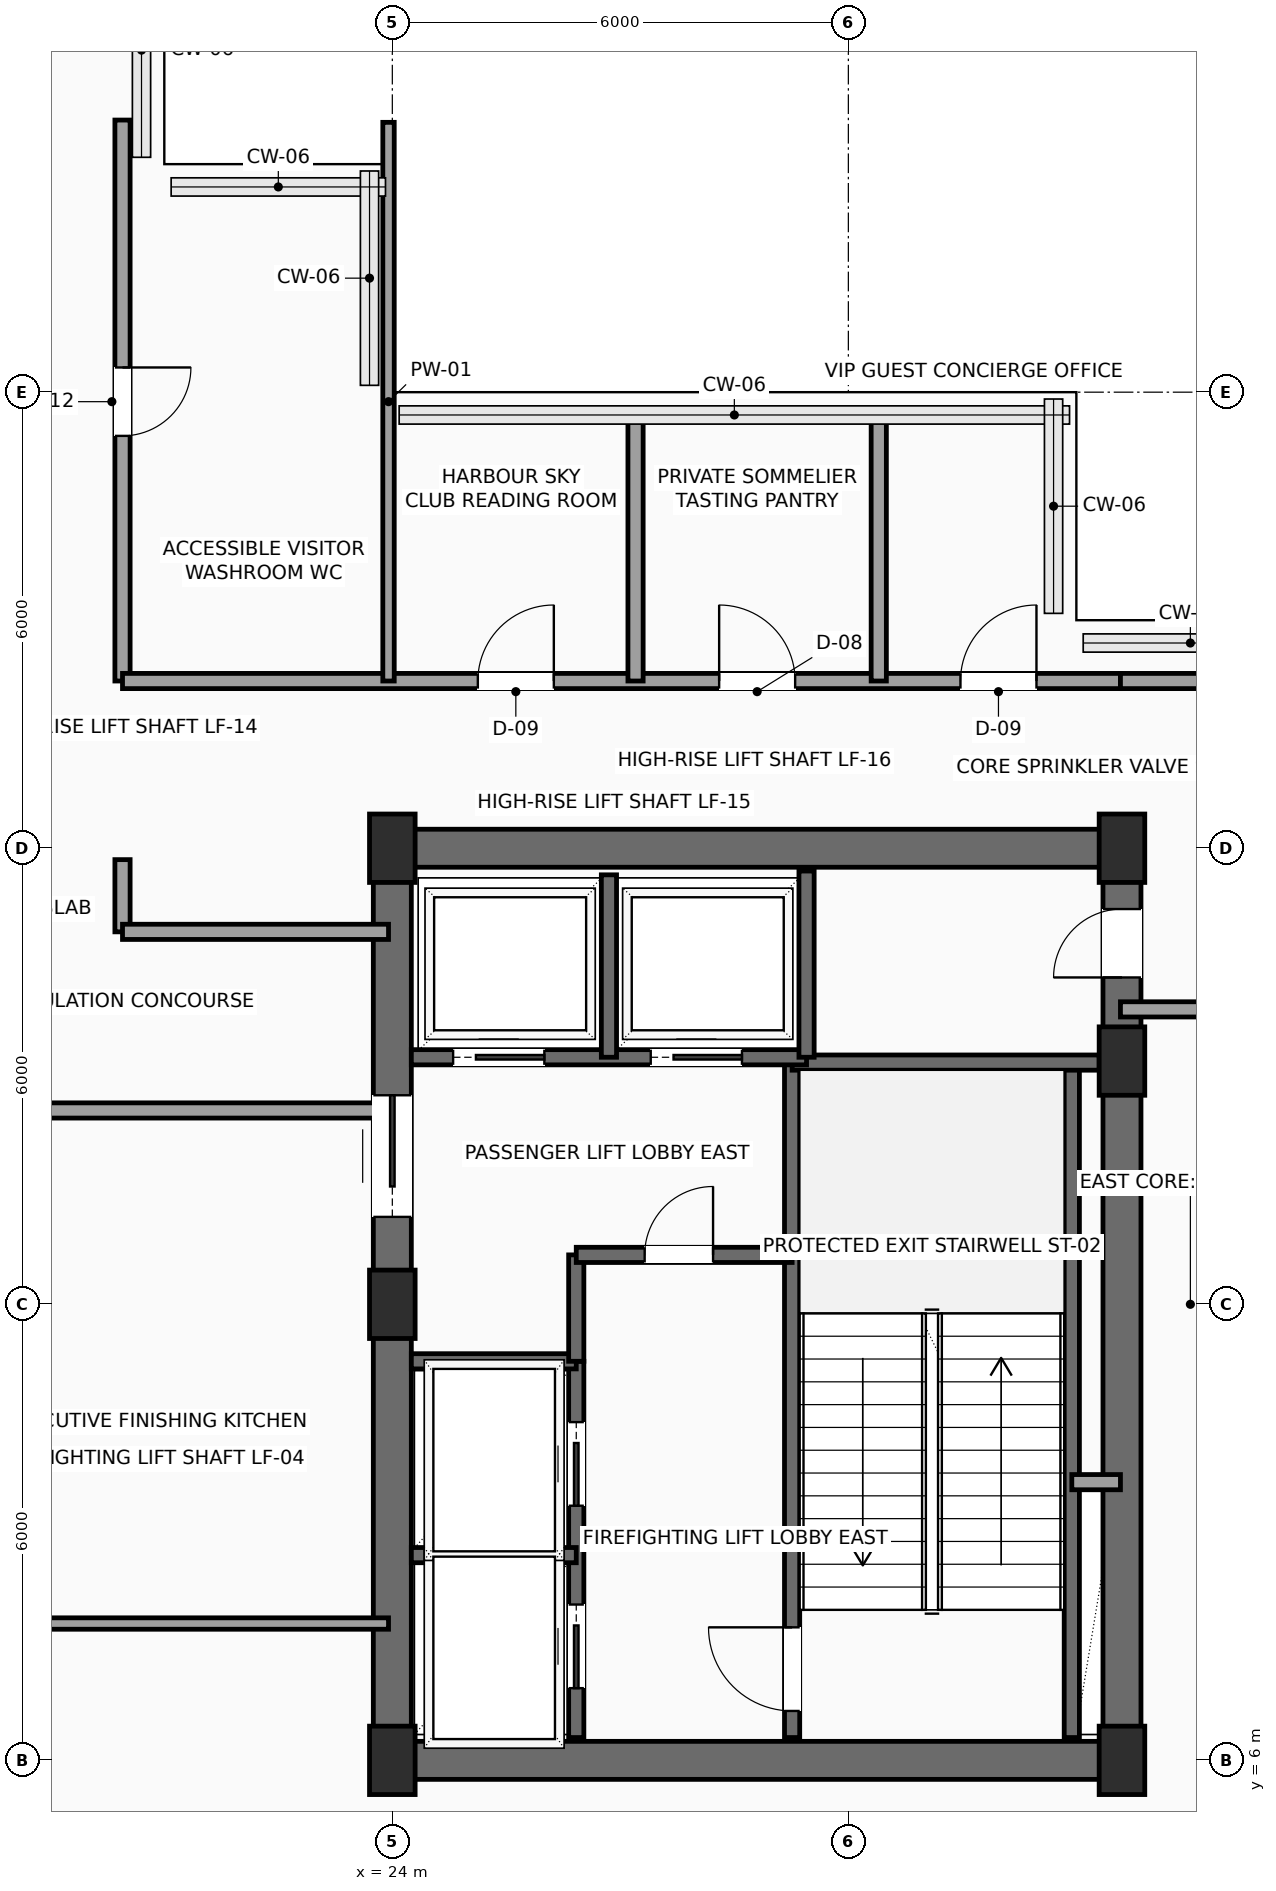
"""IFC4 building model, lengths in metres.
Left out: names, types, materials, properties, quantities, classifications, styles, units other than length and angle.
Written with IfcOpenShell. Run it as: python <this file> out.ifc"""

import sys

from ifc_helpers import new_model, si_unit, direction, frame, frame_2d, origin, origin_2d, place, context, subcontext, project, spatial, rectangle, extrude, element, fill, save


model = new_model("IFC4")
c1 = context("Model", 3, precision=1e-05, world=origin(), true_north=direction((0.0, 1.0)))
c2 = subcontext(c1, "Body", "Model", "MODEL_VIEW")
j1 = project(units=[si_unit("LENGTHUNIT", "METRE"), si_unit("PLANEANGLEUNIT", "RADIAN")], contexts=[c1])
p1 = place(None, origin())
s1 = spatial("IfcSite", under=j1, at=p1, CompositionType="ELEMENT")
p2 = place(p1, origin())
s2 = spatial("IfcBuilding", under=s1, at=p2, CompositionType="ELEMENT")
p3 = place(p2, frame((0.0, 0.0, 292.2)))
s3 = spatial("IfcBuildingStorey", under=s2, at=p3, CompositionType="ELEMENT", Elevation=292.2)
for number, where, z_axis, x_axis in (
    (1, (24.0, 6.0, 0.0), (0.0, 0.0, 1.0), (1.0, 0.0, 0.0)),
    (2, (24.0, 12.0, 0.0), (0.0, 0.0, 1.0), (1.0, 0.0, 0.0)),
    (3, (24.0, 18.0, 0.0), (0.0, 0.0, 1.0), (1.0, 0.0, 0.0)),
    (4, (33.6, 6.0, 0.0), (0.0, 0.0, 1.0), (1.0, 0.0, 0.0)),
    (5, (33.6, 15.2, 0.0), (0.0, 0.0, 1.0), (1.0, 0.0, 0.0)),
    (6, (33.6, 18.0, 0.0), (0.0, 0.0, 1.0), (1.0, 0.0, 0.0)),
):
    element("IfcColumn", number, at=place(p3, frame(where, z_axis=z_axis, x_axis=x_axis)), inside=s3, PredefinedType="COLUMN", context=c2, shape_type="SweptSolid", body=[
        extrude(rectangle(XDim=0.6, YDim=0.9, at=origin_2d()), origin(), (0.0, 0.0, 1.0), 4.2),
    ])
for number, where, z_axis, x_axis in (
    (7, (24.0, 6.0, 0.0), (0.0, 0.0, 1.0), (1.0, 0.0, 0.0)),
    (8, (24.0, 18.0, 0.0), (0.0, 0.0, 1.0), (1.0, 0.0, 0.0)),
):
    element("IfcWall", number, at=place(p3, frame(where, z_axis=z_axis, x_axis=x_axis)), inside=s3, PredefinedType="SHEAR", context=c2, shape_type="SweptSolid", body=[
        extrude(rectangle(XDim=9.6, YDim=0.5, at=frame_2d((4.8, 0.0))), origin(), (0.0, 0.0, 1.0), 4.0),
    ])
p4 = place(p3, frame((24.0, 6.0, 0.0), z_axis=(0.0, 0.0, 1.0), x_axis=(0.0, 1.0, 0.0)))
e9 = element("IfcWall", 9, at=p4, inside=s3, PredefinedType="SHEAR", context=c2, shape_type="SweptSolid", body=[
    extrude(rectangle(XDim=12.0, YDim=0.5, at=frame_2d((6.0, 0.0))), origin(), (0.0, 0.0, 1.0), 4.0),
])
p5 = place(p4, frame((7.15, 0.0, 0.0)))
e10 = element("IfcOpeningElement", 10, at=p5, cuts=e9, PredefinedType="OPENING", context=c2, shape_type="SweptSolid", body=[
    extrude(rectangle(XDim=1.6, YDim=2.3, at=frame_2d((0.8, 1.15))), frame((0.0, 0.26, 0.0), z_axis=(0.0, -1.0, 0.0), x_axis=(1.0, 0.0, 0.0)), (0.0, 0.0, 1.0), 0.52),
])
p6 = place(p3, frame((33.6, 6.0, 0.0), z_axis=(0.0, 0.0, 1.0), x_axis=(0.0, 1.0, 0.0)))
e11 = element("IfcWall", 11, at=p6, inside=s3, PredefinedType="SHEAR", context=c2, shape_type="SweptSolid", body=[
    extrude(rectangle(XDim=12.0, YDim=0.5, at=frame_2d((6.0, 0.0))), origin(), (0.0, 0.0, 1.0), 4.0),
])
p7 = place(p6, frame((10.3, 0.0, 0.0)))
e12 = element("IfcOpeningElement", 12, at=p7, cuts=e11, PredefinedType="OPENING", context=c2, shape_type="SweptSolid", body=[
    extrude(rectangle(XDim=0.9, YDim=2.15, at=frame_2d((0.45, 1.075))), frame((0.0, 0.26, 0.0), z_axis=(0.0, -1.0, 0.0), x_axis=(1.0, 0.0, 0.0)), (0.0, 0.0, 1.0), 0.52),
])
p8 = place(p3, frame((29.26, 6.3, 0.0), z_axis=(0.0, 0.0, 1.0), x_axis=(0.0, 1.0, 0.0)))
e13 = element("IfcWall", 13, at=p8, inside=s3, PredefinedType="SHEAR", context=c2, shape_type="SweptSolid", body=[
    extrude(rectangle(XDim=8.88, YDim=0.2, at=frame_2d((4.44, 0.0))), origin(), (0.0, 0.0, 1.0), 4.0),
])
p9 = place(p8, frame((0.35, 0.0, 0.0)))
e14 = element("IfcOpeningElement", 14, at=p9, cuts=e13, PredefinedType="OPENING", context=c2, shape_type="SweptSolid", body=[
    extrude(rectangle(XDim=1.1, YDim=2.2, at=frame_2d((0.55, 1.1))), frame((0.0, 0.11, 0.0), z_axis=(0.0, -1.0, 0.0), x_axis=(1.0, 0.0, 0.0)), (0.0, 0.0, 1.0), 0.22),
])
p10 = place(p3, frame((32.94, 6.3, 0.0), z_axis=(0.0, 0.0, 1.0), x_axis=(0.0, 1.0, 0.0)))
e15 = element("IfcWall", 15, at=p10, inside=s3, PredefinedType="SHEAR", context=c2, shape_type="SweptSolid", body=[
    extrude(rectangle(XDim=8.88, YDim=0.2, at=frame_2d((4.44, 0.0))), origin(), (0.0, 0.0, 1.0), 4.0),
])
p11 = place(p3, frame((29.26, 15.18, 0.0), z_axis=(0.0, 0.0, 1.0), x_axis=(1.0, 0.0, 0.0)))
e16 = element("IfcWall", 16, at=p11, inside=s3, PredefinedType="SHEAR", context=c2, shape_type="SweptSolid", body=[
    extrude(rectangle(XDim=4.04, YDim=0.2, at=frame_2d((2.02, 0.0))), origin(), (0.0, 0.0, 1.0), 4.0),
])
p12 = place(p3, frame((26.42, 6.3, 0.0), z_axis=(0.0, 0.0, 1.0), x_axis=(0.0, 1.0, 0.0)))
e17 = element("IfcWall", 17, at=p12, inside=s3, PredefinedType="SHEAR", context=c2, shape_type="SweptSolid", body=[
    extrude(rectangle(XDim=4.95, YDim=0.2, at=frame_2d((2.475, 0.0))), origin(), (0.0, 0.0, 1.0), 4.0),
])
p13 = place(p12, frame((0.65, 0.0, 0.0)))
e18 = element("IfcOpeningElement", 18, at=p13, cuts=e17, PredefinedType="OPENING", context=c2, shape_type="SweptSolid", body=[
    extrude(rectangle(XDim=1.1, YDim=2.2, at=frame_2d((0.55, 1.1))), frame((0.0, 0.11, 0.0), z_axis=(0.0, -1.0, 0.0), x_axis=(1.0, 0.0, 0.0)), (0.0, 0.0, 1.0), 0.22),
])
p14 = place(p12, frame((3.05, 0.0, 0.0)))
e19 = element("IfcOpeningElement", 19, at=p14, cuts=e17, PredefinedType="OPENING", context=c2, shape_type="SweptSolid", body=[
    extrude(rectangle(XDim=1.1, YDim=2.2, at=frame_2d((0.55, 1.1))), frame((0.0, 0.11, 0.0), z_axis=(0.0, -1.0, 0.0), x_axis=(1.0, 0.0, 0.0)), (0.0, 0.0, 1.0), 0.22),
])
for number, where, z_axis, x_axis in (
    (20, (24.25, 8.7, 0.0), (0.0, 0.0, 1.0), (1.0, 0.0, 0.0)),
    (21, (24.25, 11.25, 0.0), (0.0, 0.0, 1.0), (1.0, 0.0, 0.0)),
):
    element("IfcWall", number, at=place(p3, frame(where, z_axis=z_axis, x_axis=x_axis)), inside=s3, PredefinedType="SHEAR", context=c2, shape_type="SweptSolid", body=[
        extrude(rectangle(XDim=2.17, YDim=0.2, at=frame_2d((1.085, 0.0))), origin(), (0.0, 0.0, 1.0), 4.0),
    ])
p15 = place(p3, frame((26.42, 11.25, 0.0), z_axis=(0.0, 0.0, 1.0), x_axis=(0.0, 1.0, 0.0)))
e22 = element("IfcWall", 22, at=p15, inside=s3, PredefinedType="SHEAR", context=c2, shape_type="SweptSolid", body=[
    extrude(rectangle(XDim=1.4, YDim=0.2, at=frame_2d((0.7, 0.0))), origin(), (0.0, 0.0, 1.0), 4.0),
])
p16 = place(p3, frame((26.42, 12.65, 0.0), z_axis=(0.0, 0.0, 1.0), x_axis=(1.0, 0.0, 0.0)))
e23 = element("IfcWall", 23, at=p16, inside=s3, PredefinedType="SHEAR", context=c2, shape_type="SweptSolid", body=[
    extrude(rectangle(XDim=2.84, YDim=0.2, at=frame_2d((1.42, 0.0))), origin(), (0.0, 0.0, 1.0), 4.0),
])
p17 = place(p16, frame((0.9, 0.0, 0.0)))
e24 = element("IfcOpeningElement", 24, at=p17, cuts=e23, PredefinedType="OPENING", context=c2, shape_type="SweptSolid", body=[
    extrude(rectangle(XDim=0.9, YDim=2.15, at=frame_2d((0.45, 1.075))), frame((0.0, 0.11, 0.0), z_axis=(0.0, -1.0, 0.0), x_axis=(1.0, 0.0, 0.0)), (0.0, 0.0, 1.0), 0.22),
])
p18 = place(p3, frame((32.94, 9.66, 0.0), z_axis=(0.0, 0.0, 1.0), x_axis=(1.0, 0.0, 0.0)))
e25 = element("IfcWall", 25, at=p18, inside=s3, PredefinedType="SOLIDWALL", context=c2, shape_type="SweptSolid", body=[
    extrude(rectangle(XDim=0.64, YDim=0.2, at=frame_2d((0.32, 0.0))), origin(), (0.0, 0.0, 1.0), 4.0),
])
p19 = place(p3, frame((24.25, 15.25, 0.0), z_axis=(0.0, 0.0, 1.0), x_axis=(1.0, 0.0, 0.0)))
e26 = element("IfcWall", 26, at=p19, inside=s3, PredefinedType="SHEAR", context=c2, shape_type="SweptSolid", body=[
    extrude(rectangle(XDim=5.2, YDim=0.2, at=frame_2d((2.6, 0.0))), origin(), (0.0, 0.0, 1.0), 4.0),
])
p20 = place(p19, frame((0.55, 0.0, 0.0)))
e27 = element("IfcOpeningElement", 27, at=p20, cuts=e26, PredefinedType="OPENING", context=c2, shape_type="SweptSolid", body=[
    extrude(rectangle(XDim=1.2, YDim=2.2, at=frame_2d((0.6, 1.1))), frame((0.0, 0.11, 0.0), z_axis=(0.0, -1.0, 0.0), x_axis=(1.0, 0.0, 0.0)), (0.0, 0.0, 1.0), 0.22),
])
p21 = place(p19, frame((3.15, 0.0, 0.0)))
e28 = element("IfcOpeningElement", 28, at=p21, cuts=e26, PredefinedType="OPENING", context=c2, shape_type="SweptSolid", body=[
    extrude(rectangle(XDim=1.2, YDim=2.2, at=frame_2d((0.6, 1.1))), frame((0.0, 0.11, 0.0), z_axis=(0.0, -1.0, 0.0), x_axis=(1.0, 0.0, 0.0)), (0.0, 0.0, 1.0), 0.22),
])
p22 = place(p3, frame((26.85, 15.25, 0.0), z_axis=(0.0, 0.0, 1.0), x_axis=(0.0, 1.0, 0.0)))
e29 = element("IfcWall", 29, at=p22, inside=s3, PredefinedType="SHEAR", context=c2, shape_type="SweptSolid", body=[
    extrude(rectangle(XDim=2.4, YDim=0.2, at=frame_2d((1.2, 0.0))), origin(), (0.0, 0.0, 1.0), 4.0),
])
p23 = place(p3, frame((29.45, 15.25, 0.0), z_axis=(0.0, 0.0, 1.0), x_axis=(0.0, 1.0, 0.0)))
e30 = element("IfcWall", 30, at=p23, inside=s3, PredefinedType="SHEAR", context=c2, shape_type="SweptSolid", body=[
    extrude(rectangle(XDim=2.45, YDim=0.2, at=frame_2d((1.225, 0.0))), origin(), (0.0, 0.0, 1.0), 4.0),
])
p24 = place(p3, frame((20.45, 27.58, 0.0), z_axis=(0.0, 0.0, 1.0), x_axis=(0.0, -1.0, 0.0)))
e31 = element("IfcWall", 31, at=p24, inside=s3, PredefinedType="PARTITIONING", context=c2, shape_type="SweptSolid", body=[
    extrude(rectangle(XDim=7.38, YDim=0.2, at=frame_2d((3.69, 0.0))), origin(), (0.0, 0.0, 1.0), 4.0),
])
p25 = place(p24, frame((3.255, 0.0, 0.0)))
e32 = element("IfcOpeningElement", 32, at=p25, cuts=e31, PredefinedType="OPENING", context=c2, shape_type="SweptSolid", body=[
    extrude(rectangle(XDim=0.9, YDim=2.1, at=frame_2d((0.45, 1.05))), frame((0.0, 0.11, 0.0), z_axis=(0.0, -1.0, 0.0), x_axis=(1.0, 0.0, 0.0)), (0.0, 0.0, 1.0), 0.22),
])
p26 = place(p3, frame((20.45, 20.2, 0.0), z_axis=(0.0, 0.0, 1.0), x_axis=(1.0, 0.0, 0.0)))
e33 = element("IfcWall", 33, at=p26, inside=s3, PredefinedType="PARTITIONING", context=c2, shape_type="SweptSolid", body=[
    extrude(rectangle(XDim=13.13, YDim=0.2, at=frame_2d((6.565, 0.0))), origin(), (0.0, 0.0, 1.0), 4.0),
])
p27 = place(p26, frame((4.675, 0.0, 0.0)))
e34 = element("IfcOpeningElement", 34, at=p27, cuts=e33, PredefinedType="OPENING", context=c2, shape_type="SweptSolid", body=[
    extrude(rectangle(XDim=1.0, YDim=2.2, at=frame_2d((0.5, 1.1))), frame((0.0, 0.11, 0.0), z_axis=(0.0, -1.0, 0.0), x_axis=(1.0, 0.0, 0.0)), (0.0, 0.0, 1.0), 0.22),
])
p28 = place(p26, frame((7.85, 0.0, 0.0)))
e35 = element("IfcOpeningElement", 35, at=p28, cuts=e33, PredefinedType="OPENING", context=c2, shape_type="SweptSolid", body=[
    extrude(rectangle(XDim=1.0, YDim=2.2, at=frame_2d((0.5, 1.1))), frame((0.0, 0.11, 0.0), z_axis=(0.0, -1.0, 0.0), x_axis=(1.0, 0.0, 0.0)), (0.0, 0.0, 1.0), 0.22),
])
p29 = place(p26, frame((11.025, 0.0, 0.0)))
e36 = element("IfcOpeningElement", 36, at=p29, cuts=e33, PredefinedType="OPENING", context=c2, shape_type="SweptSolid", body=[
    extrude(rectangle(XDim=1.0, YDim=2.2, at=frame_2d((0.5, 1.1))), frame((0.0, 0.11, 0.0), z_axis=(0.0, -1.0, 0.0), x_axis=(1.0, 0.0, 0.0)), (0.0, 0.0, 1.0), 0.22),
])
for number, where, z_axis, x_axis in (
    (37, (33.58, 20.2, 0.0), (0.0, 0.0, 1.0), (1.0, 0.0, 0.0)),
    (38, (35.7, 15.88, 0.0), (0.0, 0.0, 1.0), (-1.0, 0.0, 0.0)),
):
    element("IfcWall", number, at=place(p3, frame(where, z_axis=z_axis, x_axis=x_axis)), inside=s3, PredefinedType="PARTITIONING", context=c2, shape_type="SweptSolid", body=[
        extrude(rectangle(XDim=2.12, YDim=0.2, at=frame_2d((1.06, 0.0))), origin(), (0.0, 0.0, 1.0), 4.0),
    ])
p30 = place(p3, frame((20.45, 17.85, 0.0), z_axis=(0.0, 0.0, 1.0), x_axis=(0.0, -1.0, 0.0)))
e39 = element("IfcWall", 39, at=p30, inside=s3, PredefinedType="PARTITIONING", context=c2, shape_type="SweptSolid", body=[
    extrude(rectangle(XDim=0.95, YDim=0.2, at=frame_2d((0.475, 0.0))), origin(), (0.0, 0.0, 1.0), 4.0),
])
p31 = place(p3, frame((20.45, 16.9, 0.0), z_axis=(0.0, 0.0, 1.0), x_axis=(1.0, 0.0, 0.0)))
e40 = element("IfcWall", 40, at=p31, inside=s3, PredefinedType="PARTITIONING", context=c2, shape_type="SweptSolid", body=[
    extrude(rectangle(XDim=3.5, YDim=0.2, at=frame_2d((1.75, 0.0))), origin(), (0.0, 0.0, 1.0), 4.0),
])
p32 = place(p3, frame((23.95, 14.55, 0.0), z_axis=(0.0, 0.0, 1.0), x_axis=(-1.0, 0.0, 0.0)))
e41 = element("IfcWall", 41, at=p32, inside=s3, PredefinedType="PARTITIONING", context=c2, shape_type="SweptSolid", body=[
    extrude(rectangle(XDim=9.0, YDim=0.2, at=frame_2d((4.5, 0.0))), origin(), (0.0, 0.0, 1.0), 4.0),
])
p33 = place(p3, frame((23.95, 20.2, 0.0), z_axis=(0.0, 0.0, 1.0), x_axis=(0.0, 1.0, 0.0)))
e42 = element("IfcWall", 42, at=p33, inside=s3, PredefinedType="PARTITIONING", context=c2, shape_type="SweptSolid", body=[
    extrude(rectangle(XDim=7.35, YDim=0.15, at=frame_2d((3.675, 0.0))), origin(), (0.0, 0.0, 1.0), 4.0),
])
for number, where, z_axis, x_axis in (
    (43, (27.2, 20.2, 0.0), (0.0, 0.0, 1.0), (0.0, 1.0, 0.0)),
    (44, (30.4, 20.2, 0.0), (0.0, 0.0, 1.0), (0.0, 1.0, 0.0)),
):
    element("IfcWall", number, at=place(p3, frame(where, z_axis=z_axis, x_axis=x_axis)), inside=s3, PredefinedType="PARTITIONING", context=c2, shape_type="SweptSolid", body=[
        extrude(rectangle(XDim=3.5, YDim=0.2, at=frame_2d((1.75, 0.0))), origin(), (0.0, 0.0, 1.0), 4.0),
    ])
p34 = place(p3, frame((14.95, 7.8, 0.0), z_axis=(0.0, 0.0, 1.0), x_axis=(1.0, 0.0, 0.0)))
e45 = element("IfcWall", 45, at=p34, inside=s3, PredefinedType="PARTITIONING", context=c2, shape_type="SweptSolid", body=[
    extrude(rectangle(XDim=9.0, YDim=0.15, at=frame_2d((4.5, 0.0))), origin(), (0.0, 0.0, 1.0), 4.0),
])
p35 = place(p5, origin())
e46 = element("IfcDoor", 46, at=p35, inside=s3, OperationType="DOUBLE_DOOR_SLIDING", PredefinedType="DOOR", context=c2, shape_type="SweptSolid", body=[
    extrude(rectangle(XDim=1.6, YDim=2.3, at=frame_2d((0.8, 1.15))), frame((0.0, 0.025, 0.0), z_axis=(0.0, -1.0, 0.0), x_axis=(1.0, 0.0, 0.0)), (0.0, 0.0, 1.0), 0.05),
])
fill(e10, e46)
p36 = place(p7, origin())
e47 = element("IfcDoor", 47, at=p36, inside=s3, OperationType="SINGLE_SWING_LEFT", PredefinedType="DOOR", context=c2, shape_type="SweptSolid", body=[
    extrude(rectangle(XDim=0.9, YDim=2.15, at=frame_2d((0.45, 1.075))), frame((0.0, 0.025, 0.0), z_axis=(0.0, -1.0, 0.0), x_axis=(1.0, 0.0, 0.0)), (0.0, 0.0, 1.0), 0.05),
])
fill(e12, e47)
p37 = place(p9, origin())
e48 = element("IfcDoor", 48, at=p37, inside=s3, OperationType="SINGLE_SWING_RIGHT", PredefinedType="DOOR", context=c2, shape_type="SweptSolid", body=[
    extrude(rectangle(XDim=1.1, YDim=2.2, at=frame_2d((0.55, 1.1))), frame((0.0, 0.025, 0.0), z_axis=(0.0, -1.0, 0.0), x_axis=(1.0, 0.0, 0.0)), (0.0, 0.0, 1.0), 0.05),
])
fill(e14, e48)
p38 = place(p13, origin())
e49 = element("IfcDoor", 49, at=p38, inside=s3, OperationType="SLIDING_TO_LEFT", PredefinedType="DOOR", context=c2, shape_type="SweptSolid", body=[
    extrude(rectangle(XDim=1.1, YDim=2.2, at=frame_2d((0.55, 1.1))), frame((0.0, 0.025, 0.0), z_axis=(0.0, -1.0, 0.0), x_axis=(1.0, 0.0, 0.0)), (0.0, 0.0, 1.0), 0.05),
])
fill(e18, e49)
p39 = place(p14, origin())
e50 = element("IfcDoor", 50, at=p39, inside=s3, OperationType="SLIDING_TO_LEFT", PredefinedType="DOOR", context=c2, shape_type="SweptSolid", body=[
    extrude(rectangle(XDim=1.1, YDim=2.2, at=frame_2d((0.55, 1.1))), frame((0.0, 0.025, 0.0), z_axis=(0.0, -1.0, 0.0), x_axis=(1.0, 0.0, 0.0)), (0.0, 0.0, 1.0), 0.05),
])
fill(e19, e50)
p40 = place(p17, origin())
e51 = element("IfcDoor", 51, at=p40, inside=s3, OperationType="SINGLE_SWING_RIGHT", PredefinedType="DOOR", context=c2, shape_type="SweptSolid", body=[
    extrude(rectangle(XDim=0.9, YDim=2.15, at=frame_2d((0.45, 1.075))), frame((0.0, 0.025, 0.0), z_axis=(0.0, -1.0, 0.0), x_axis=(1.0, 0.0, 0.0)), (0.0, 0.0, 1.0), 0.05),
])
fill(e24, e51)
p41 = place(p20, origin())
e52 = element("IfcDoor", 52, at=p41, inside=s3, OperationType="SLIDING_TO_RIGHT", PredefinedType="DOOR", context=c2, shape_type="SweptSolid", body=[
    extrude(rectangle(XDim=1.2, YDim=2.2, at=frame_2d((0.6, 1.1))), frame((0.0, 0.025, 0.0), z_axis=(0.0, -1.0, 0.0), x_axis=(1.0, 0.0, 0.0)), (0.0, 0.0, 1.0), 0.05),
])
fill(e27, e52)
p42 = place(p21, origin())
e53 = element("IfcDoor", 53, at=p42, inside=s3, OperationType="SLIDING_TO_RIGHT", PredefinedType="DOOR", context=c2, shape_type="SweptSolid", body=[
    extrude(rectangle(XDim=1.2, YDim=2.2, at=frame_2d((0.6, 1.1))), frame((0.0, 0.025, 0.0), z_axis=(0.0, -1.0, 0.0), x_axis=(1.0, 0.0, 0.0)), (0.0, 0.0, 1.0), 0.05),
])
fill(e28, e53)
p43 = place(p25, origin())
e54 = element("IfcDoor", 54, at=p43, inside=s3, OperationType="SINGLE_SWING_LEFT", PredefinedType="DOOR", context=c2, shape_type="SweptSolid", body=[
    extrude(rectangle(XDim=0.9, YDim=2.1, at=frame_2d((0.45, 1.05))), frame((0.0, 0.025, 0.0), z_axis=(0.0, -1.0, 0.0), x_axis=(1.0, 0.0, 0.0)), (0.0, 0.0, 1.0), 0.05),
])
fill(e32, e54)
p44 = place(p27, origin())
e55 = element("IfcDoor", 55, at=p44, inside=s3, OperationType="SINGLE_SWING_RIGHT", PredefinedType="DOOR", context=c2, shape_type="SweptSolid", body=[
    extrude(rectangle(XDim=1.0, YDim=2.2, at=frame_2d((0.5, 1.1))), frame((0.0, 0.025, 0.0), z_axis=(0.0, -1.0, 0.0), x_axis=(1.0, 0.0, 0.0)), (0.0, 0.0, 1.0), 0.05),
])
fill(e34, e55)
p45 = place(p28, origin())
e56 = element("IfcDoor", 56, at=p45, inside=s3, OperationType="SINGLE_SWING_LEFT", PredefinedType="DOOR", context=c2, shape_type="SweptSolid", body=[
    extrude(rectangle(XDim=1.0, YDim=2.2, at=frame_2d((0.5, 1.1))), frame((0.0, 0.025, 0.0), z_axis=(0.0, -1.0, 0.0), x_axis=(1.0, 0.0, 0.0)), (0.0, 0.0, 1.0), 0.05),
])
fill(e35, e56)
p46 = place(p29, origin())
e57 = element("IfcDoor", 57, at=p46, inside=s3, OperationType="SINGLE_SWING_RIGHT", PredefinedType="DOOR", context=c2, shape_type="SweptSolid", body=[
    extrude(rectangle(XDim=1.0, YDim=2.2, at=frame_2d((0.5, 1.1))), frame((0.0, 0.025, 0.0), z_axis=(0.0, -1.0, 0.0), x_axis=(1.0, 0.0, 0.0)), (0.0, 0.0, 1.0), 0.05),
])
fill(e36, e57)
save(model, sys.argv[1])
